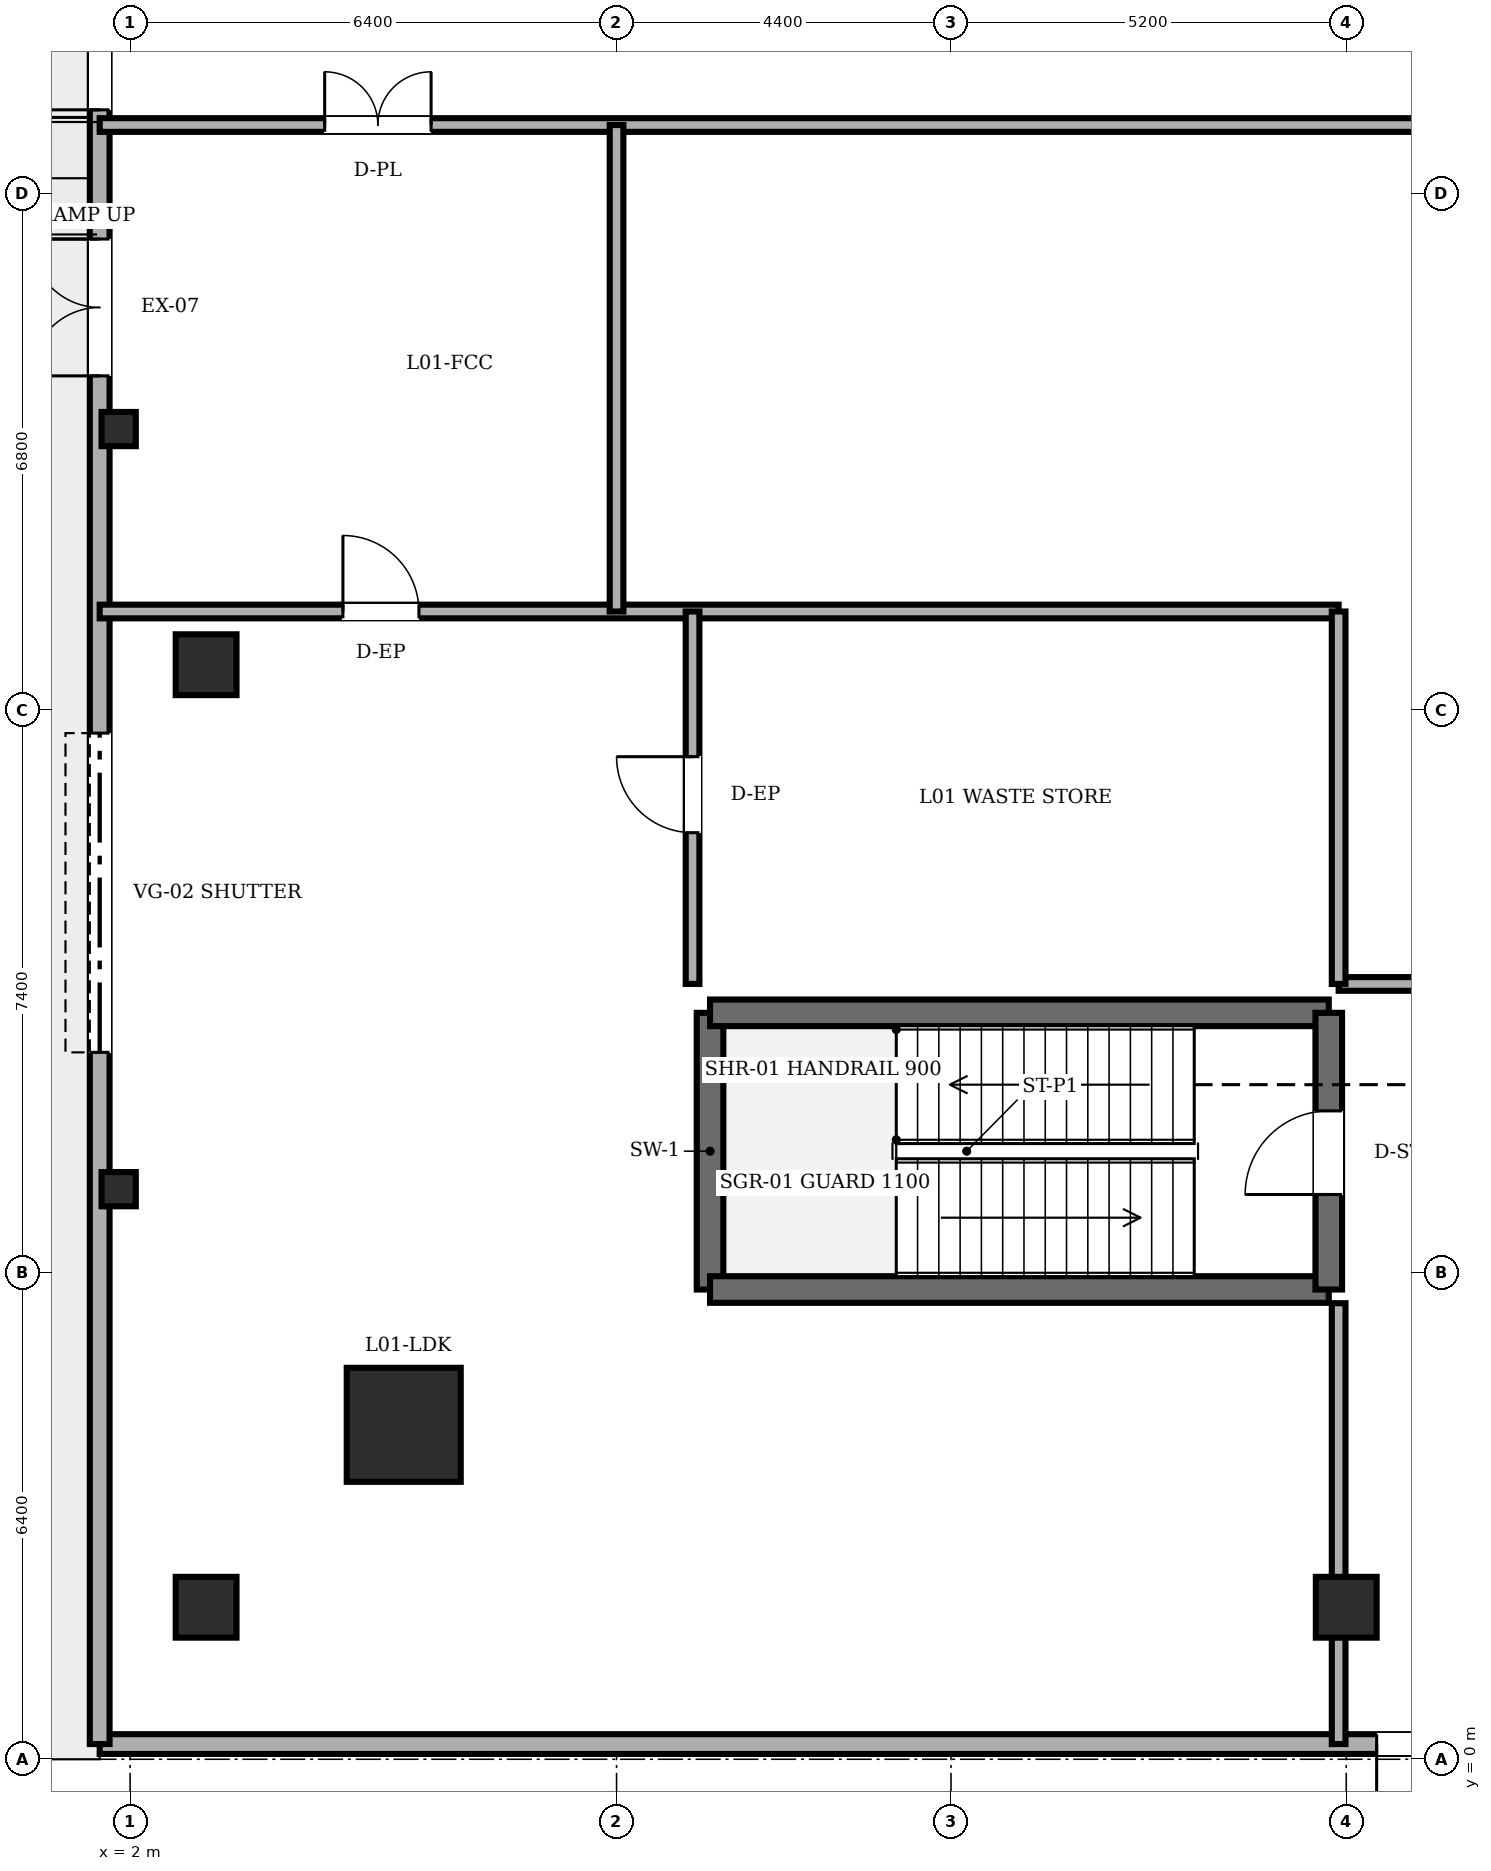
"""IFC4 building model, lengths in metres.
Left out: names, types, materials, properties, quantities, classifications, styles, units other than length and angle.
Written with IfcOpenShell. Run it as: python <this file> out.ifc"""

import sys

from ifc_helpers import new_model, si_unit, direction, frame, frame_2d, origin, origin_2d, place, context, subcontext, project, spatial, rectangle, circle, extrude, element, fill, save


model = new_model("IFC4")
c1 = context("Model", 3, precision=1e-05, world=origin(), true_north=direction((0.0, 1.0)))
c2 = subcontext(c1, "Body", "Model", "MODEL_VIEW")
j1 = project(units=[si_unit("LENGTHUNIT", "METRE"), si_unit("PLANEANGLEUNIT", "RADIAN")], contexts=[c1])
p1 = place(None, origin())
s1 = spatial("IfcSite", under=j1, at=p1, CompositionType="ELEMENT")
p2 = place(p1, origin())
s2 = spatial("IfcBuilding", under=s1, at=p2, CompositionType="ELEMENT")
p3 = place(p2, origin())
s3 = spatial("IfcBuildingStorey", under=s2, at=p3, CompositionType="ELEMENT", Elevation=0.0)
p4 = place(p3, frame((5.6, 4.4, 0.0), z_axis=(0.0, 0.0, 1.0), x_axis=(1.0, 0.0, 0.0)))
e1 = element("IfcColumn", 1, at=p4, inside=s3, PredefinedType="COLUMN", context=c2, shape_type="SweptSolid", body=[
    extrude(circle(Radius=0.75, at=origin_2d()), origin(), (0.0, 0.0, 1.0), 5.4),
])
for number, where, z_axis, x_axis in (
    (2, (3.0, 2.0, 0.0), (0.0, 0.0, 1.0), (1.0, 0.0, 0.0)),
    (3, (18.0, 2.0, 0.0), (0.0, 0.0, 1.0), (1.0, 0.0, 0.0)),
    (4, (3.0, 14.4, 0.0), (0.0, 0.0, 1.0), (1.0, 0.0, 0.0)),
):
    element("IfcColumn", number, at=place(p3, frame(where, z_axis=z_axis, x_axis=x_axis)), inside=s3, PredefinedType="COLUMN", context=c2, shape_type="SweptSolid", body=[
        extrude(rectangle(XDim=0.8, YDim=0.8, at=origin_2d()), origin(), (0.0, 0.0, 1.0), 5.4),
    ])
for number, where, z_axis, x_axis in (
    (5, (1.85, 7.5, 0.0), (0.0, 0.0, 1.0), (1.0, 0.0, 0.0)),
    (6, (1.85, 17.5, 0.0), (0.0, 0.0, 1.0), (1.0, 0.0, 0.0)),
):
    element("IfcColumn", number, at=place(p3, frame(where, z_axis=z_axis, x_axis=x_axis)), inside=s3, PredefinedType="PILASTER", context=c2, shape_type="SweptSolid", body=[
        extrude(rectangle(XDim=0.45, YDim=0.45, at=origin_2d()), origin(), (0.0, 0.0, 1.0), 5.18),
    ])
p5 = place(p3, frame((73.8, 0.2, 0.0), z_axis=(0.0, 0.0, 1.0), x_axis=(-1.0, 0.0, 0.0)))
e7 = element("IfcWall", 7, at=p5, inside=s3, PredefinedType="SOLIDWALL", context=c2, shape_type="SweptSolid", body=[
    extrude(rectangle(XDim=72.2, YDim=0.26, at=frame_2d((36.1, 0.0))), origin(), (0.0, 0.0, 1.0), 5.18),
])
p6 = place(p5, frame((53.6, 0.0, 0.0)))
e8 = element("IfcOpeningElement", 8, at=p6, cuts=e7, PredefinedType="OPENING", context=c2, shape_type="SweptSolid", body=[
    extrude(rectangle(XDim=1.8, YDim=2.4, at=frame_2d((0.9, 1.2))), frame((0.0, 0.14, 0.0), z_axis=(0.0, -1.0, 0.0), x_axis=(1.0, 0.0, 0.0)), (0.0, 0.0, 1.0), 0.28),
])
p7 = place(p5, frame((34.8, 0.0, 0.0)))
e9 = element("IfcOpeningElement", 9, at=p7, cuts=e7, PredefinedType="OPENING", context=c2, shape_type="SweptSolid", body=[
    extrude(rectangle(XDim=1.8, YDim=2.4, at=frame_2d((0.9, 1.2))), frame((0.0, 0.14, 0.0), z_axis=(0.0, -1.0, 0.0), x_axis=(1.0, 0.0, 0.0)), (0.0, 0.0, 1.0), 0.28),
])
p8 = place(p3, frame((1.6, 0.2, 0.0), z_axis=(0.0, 0.0, 1.0), x_axis=(0.0, 1.0, 0.0)))
e10 = element("IfcWall", 10, at=p8, inside=s3, PredefinedType="SOLIDWALL", context=c2, shape_type="SweptSolid", body=[
    extrude(rectangle(XDim=47.6, YDim=0.26, at=frame_2d((23.8, 0.0))), origin(), (0.0, 0.0, 1.0), 5.18),
])
p9 = place(p8, frame((9.1, 0.0, 0.0)))
e11 = element("IfcOpeningElement", 11, at=p9, cuts=e10, PredefinedType="OPENING", context=c2, shape_type="SweptSolid", body=[
    extrude(rectangle(XDim=4.2, YDim=3.6, at=frame_2d((2.1, 1.8))), frame((0.0, 0.14, 0.0), z_axis=(0.0, -1.0, 0.0), x_axis=(1.0, 0.0, 0.0)), (0.0, 0.0, 1.0), 0.28),
])
p10 = place(p8, frame((21.5, 0.0, 0.0)))
e12 = element("IfcOpeningElement", 12, at=p10, cuts=e10, PredefinedType="OPENING", context=c2, shape_type="SweptSolid", body=[
    extrude(rectangle(XDim=2.0, YDim=2.5, at=frame_2d((1.0, 1.25))), frame((0.0, 0.14, 0.0), z_axis=(0.0, -1.0, 0.0), x_axis=(1.0, 0.0, 0.0)), (0.0, 0.0, 1.0), 0.28),
])
p11 = place(p8, frame((28.6, 0.0, 0.0)))
e13 = element("IfcOpeningElement", 13, at=p11, cuts=e10, PredefinedType="OPENING", context=c2, shape_type="SweptSolid", body=[
    extrude(rectangle(XDim=1.8, YDim=2.4, at=frame_2d((0.9, 1.2))), frame((0.0, 0.14, 0.0), z_axis=(0.0, -1.0, 0.0), x_axis=(1.0, 0.0, 0.0)), (0.0, 0.0, 1.0), 0.28),
])
p12 = place(p8, frame((18.0, 0.0, 0.0)))
e14 = element("IfcOpeningElement", 14, at=p12, cuts=e10, PredefinedType="OPENING", context=c2, shape_type="SweptSolid", body=[
    extrude(rectangle(XDim=1.8, YDim=2.4, at=frame_2d((0.9, 1.2))), frame((0.0, 0.14, 0.0), z_axis=(0.0, -1.0, 0.0), x_axis=(1.0, 0.0, 0.0)), (0.0, 0.0, 1.0), 0.28),
])
p13 = place(p3, frame((9.63, 6.18, 0.0), z_axis=(0.0, 0.0, 1.0), x_axis=(0.0, 1.0, 0.0)))
e15 = element("IfcWall", 15, at=p13, inside=s3, PredefinedType="SOLIDWALL", context=c2, shape_type="SweptSolid", body=[
    extrude(rectangle(XDim=3.64, YDim=0.35, at=frame_2d((1.82, 0.0))), origin(), (0.0, 0.0, 1.0), 5.4),
])
for number, where, z_axis, x_axis in (
    (16, (9.63, 9.82, 0.0), (0.0, 0.0, 1.0), (1.0, 0.0, 0.0)),
    (17, (17.77, 6.18, 0.0), (0.0, 0.0, 1.0), (-1.0, 0.0, 0.0)),
):
    element("IfcWall", number, at=place(p3, frame(where, z_axis=z_axis, x_axis=x_axis)), inside=s3, PredefinedType="SOLIDWALL", context=c2, shape_type="SweptSolid", body=[
        extrude(rectangle(XDim=8.14, YDim=0.35, at=frame_2d((4.07, 0.0))), origin(), (0.0, 0.0, 1.0), 5.4),
    ])
p14 = place(p3, frame((17.77, 6.18, 0.0), z_axis=(0.0, 0.0, 1.0), x_axis=(0.0, 1.0, 0.0)))
e18 = element("IfcWall", 18, at=p14, inside=s3, PredefinedType="SOLIDWALL", context=c2, shape_type="SweptSolid", body=[
    extrude(rectangle(XDim=3.64, YDim=0.35, at=frame_2d((1.82, 0.0))), origin(), (0.0, 0.0, 1.0), 5.4),
])
p15 = place(p14, frame((1.25, 0.0, 0.0)))
e19 = element("IfcOpeningElement", 19, at=p15, cuts=e18, PredefinedType="OPENING", context=c2, shape_type="SweptSolid", body=[
    extrude(rectangle(XDim=1.1, YDim=2.15, at=frame_2d((0.55, 1.075))), frame((0.0, 0.185, 0.0), z_axis=(0.0, -1.0, 0.0), x_axis=(1.0, 0.0, 0.0)), (0.0, 0.0, 1.0), 0.37),
])
p16 = place(p3, frame((17.9, 10.2, 0.0), z_axis=(0.0, 0.0, 1.0), x_axis=(1.0, 0.0, 0.0)))
e20 = element("IfcWall", 20, at=p16, inside=s3, PredefinedType="PARTITIONING", context=c2, shape_type="SweptSolid", body=[
    extrude(rectangle(XDim=2.6, YDim=0.18, at=frame_2d((1.3, 0.0))), origin(), (0.0, 0.0, 1.0), 5.18),
])
p17 = place(p3, frame((1.6, 15.1, 0.0), z_axis=(0.0, 0.0, 1.0), x_axis=(1.0, 0.0, 0.0)))
e21 = element("IfcWall", 21, at=p17, inside=s3, PredefinedType="PARTITIONING", context=c2, shape_type="SweptSolid", body=[
    extrude(rectangle(XDim=16.3, YDim=0.18, at=frame_2d((8.15, 0.0))), origin(), (0.0, 0.0, 1.0), 5.18),
])
p18 = place(p17, frame((3.2, 0.0, 0.0)))
e22 = element("IfcOpeningElement", 22, at=p18, cuts=e21, PredefinedType="OPENING", context=c2, shape_type="SweptSolid", body=[
    extrude(rectangle(XDim=1.0, YDim=2.15, at=frame_2d((0.5, 1.075))), frame((0.0, 0.1, 0.0), z_axis=(0.0, -1.0, 0.0), x_axis=(1.0, 0.0, 0.0)), (0.0, 0.0, 1.0), 0.2),
])
p19 = place(p3, frame((1.6, 21.5, 0.0), z_axis=(0.0, 0.0, 1.0), x_axis=(1.0, 0.0, 0.0)))
e23 = element("IfcWall", 23, at=p19, inside=s3, PredefinedType="PARTITIONING", context=c2, shape_type="SweptSolid", body=[
    extrude(rectangle(XDim=19.88, YDim=0.18, at=frame_2d((9.94, 0.0))), origin(), (0.0, 0.0, 1.0), 3.282),
])
p20 = place(p19, frame((2.96, 0.0, 0.0)))
e24 = element("IfcOpeningElement", 24, at=p20, cuts=e23, PredefinedType="OPENING", context=c2, shape_type="SweptSolid", body=[
    extrude(rectangle(XDim=1.4, YDim=2.25, at=frame_2d((0.7, 1.125))), frame((0.0, 0.1, 0.0), z_axis=(0.0, -1.0, 0.0), x_axis=(1.0, 0.0, 0.0)), (0.0, 0.0, 1.0), 0.2),
])
p21 = place(p3, frame((8.4, 15.1, 0.0), z_axis=(0.0, 0.0, 1.0), x_axis=(0.0, 1.0, 0.0)))
e25 = element("IfcWall", 25, at=p21, inside=s3, PredefinedType="PARTITIONING", context=c2, shape_type="SweptSolid", body=[
    extrude(rectangle(XDim=6.4, YDim=0.18, at=frame_2d((3.2, 0.0))), origin(), (0.0, 0.0, 1.0), 5.18),
])
p22 = place(p3, frame((9.4, 10.2, 0.0), z_axis=(0.0, 0.0, 1.0), x_axis=(0.0, 1.0, 0.0)))
e26 = element("IfcWall", 26, at=p22, inside=s3, PredefinedType="PARTITIONING", context=c2, shape_type="SweptSolid", body=[
    extrude(rectangle(XDim=4.9, YDim=0.18, at=frame_2d((2.45, 0.0))), origin(), (0.0, 0.0, 1.0), 5.18),
])
p23 = place(p22, frame((1.99, 0.0, 0.0)))
e27 = element("IfcOpeningElement", 27, at=p23, cuts=e26, PredefinedType="OPENING", context=c2, shape_type="SweptSolid", body=[
    extrude(rectangle(XDim=1.0, YDim=2.15, at=frame_2d((0.5, 1.075))), frame((0.0, 0.1, 0.0), z_axis=(0.0, -1.0, 0.0), x_axis=(1.0, 0.0, 0.0)), (0.0, 0.0, 1.0), 0.2),
])
p24 = place(p3, frame((17.9, 0.2, 0.0), z_axis=(0.0, 0.0, 1.0), x_axis=(0.0, 1.0, 0.0)))
e28 = element("IfcWall", 28, at=p24, inside=s3, PredefinedType="PARTITIONING", context=c2, shape_type="SweptSolid", body=[
    extrude(rectangle(XDim=5.8, YDim=0.18, at=frame_2d((2.9, 0.0))), origin(), (0.0, 0.0, 1.0), 4.362),
])
p25 = place(p3, frame((17.9, 10.2, 0.0), z_axis=(0.0, 0.0, 1.0), x_axis=(0.0, 1.0, 0.0)))
e29 = element("IfcWall", 29, at=p25, inside=s3, PredefinedType="PARTITIONING", context=c2, shape_type="SweptSolid", body=[
    extrude(rectangle(XDim=4.9, YDim=0.18, at=frame_2d((2.45, 0.0))), origin(), (0.0, 0.0, 1.0), 5.18),
])
p26 = place(p9, origin())
e30 = element("IfcDoor", 30, at=p26, inside=s3, OperationType="ROLLINGUP", PredefinedType="GATE", context=c2, shape_type="SweptSolid", body=[
    extrude(rectangle(XDim=4.2, YDim=3.6, at=frame_2d((2.1, 1.8))), frame((0.0, 0.025, 0.0), z_axis=(0.0, -1.0, 0.0), x_axis=(1.0, 0.0, 0.0)), (0.0, 0.0, 1.0), 0.05),
])
fill(e11, e30)
p27 = place(p6, origin())
e31 = element("IfcDoor", 31, at=p27, inside=s3, OperationType="DOUBLE_DOOR_SINGLE_SWING", PredefinedType="DOOR", context=c2, shape_type="SweptSolid", body=[
    extrude(rectangle(XDim=1.8, YDim=2.4, at=frame_2d((0.9, 1.2))), frame((0.0, 0.025, 0.0), z_axis=(0.0, -1.0, 0.0), x_axis=(1.0, 0.0, 0.0)), (0.0, 0.0, 1.0), 0.05),
])
fill(e8, e31)
p28 = place(p10, origin())
e32 = element("IfcDoor", 32, at=p28, inside=s3, OperationType="DOUBLE_DOOR_SINGLE_SWING", PredefinedType="DOOR", context=c2, shape_type="SweptSolid", body=[
    extrude(rectangle(XDim=2.0, YDim=2.5, at=frame_2d((1.0, 1.25))), frame((0.0, 0.025, 0.0), z_axis=(0.0, -1.0, 0.0), x_axis=(1.0, 0.0, 0.0)), (0.0, 0.0, 1.0), 0.05),
])
fill(e12, e32)
p29 = place(p12, origin())
e33 = element("IfcDoor", 33, at=p29, inside=s3, OperationType="DOUBLE_DOOR_SINGLE_SWING", PredefinedType="DOOR", context=c2, shape_type="SweptSolid", body=[
    extrude(rectangle(XDim=1.8, YDim=2.4, at=frame_2d((0.9, 1.2))), frame((0.0, 0.025, 0.0), z_axis=(0.0, -1.0, 0.0), x_axis=(1.0, 0.0, 0.0)), (0.0, 0.0, 1.0), 0.05),
])
fill(e14, e33)
p30 = place(p15, origin())
e34 = element("IfcDoor", 34, at=p30, inside=s3, OperationType="SINGLE_SWING_LEFT", PredefinedType="DOOR", context=c2, shape_type="SweptSolid", body=[
    extrude(rectangle(XDim=1.1, YDim=2.15, at=frame_2d((0.55, 1.075))), frame((0.0, 0.025, 0.0), z_axis=(0.0, -1.0, 0.0), x_axis=(1.0, 0.0, 0.0)), (0.0, 0.0, 1.0), 0.05),
])
fill(e19, e34)
p31 = place(p20, origin())
e35 = element("IfcDoor", 35, at=p31, inside=s3, OperationType="DOUBLE_DOOR_SINGLE_SWING", PredefinedType="DOOR", context=c2, shape_type="SweptSolid", body=[
    extrude(rectangle(XDim=1.4, YDim=2.25, at=frame_2d((0.7, 1.125))), frame((0.0, 0.025, 0.0), z_axis=(0.0, -1.0, 0.0), x_axis=(1.0, 0.0, 0.0)), (0.0, 0.0, 1.0), 0.05),
])
fill(e24, e35)
p32 = place(p18, origin())
e36 = element("IfcDoor", 36, at=p32, inside=s3, OperationType="SINGLE_SWING_LEFT", PredefinedType="DOOR", context=c2, shape_type="SweptSolid", body=[
    extrude(rectangle(XDim=1.0, YDim=2.15, at=frame_2d((0.5, 1.075))), frame((0.0, 0.025, 0.0), z_axis=(0.0, -1.0, 0.0), x_axis=(1.0, 0.0, 0.0)), (0.0, 0.0, 1.0), 0.05),
])
fill(e22, e36)
p33 = place(p23, origin())
e37 = element("IfcDoor", 37, at=p33, inside=s3, OperationType="SINGLE_SWING_RIGHT", PredefinedType="DOOR", context=c2, shape_type="SweptSolid", body=[
    extrude(rectangle(XDim=1.0, YDim=2.15, at=frame_2d((0.5, 1.075))), frame((0.0, 0.025, 0.0), z_axis=(0.0, -1.0, 0.0), x_axis=(1.0, 0.0, 0.0)), (0.0, 0.0, 1.0), 0.05),
])
fill(e27, e37)
save(model, sys.argv[1])
